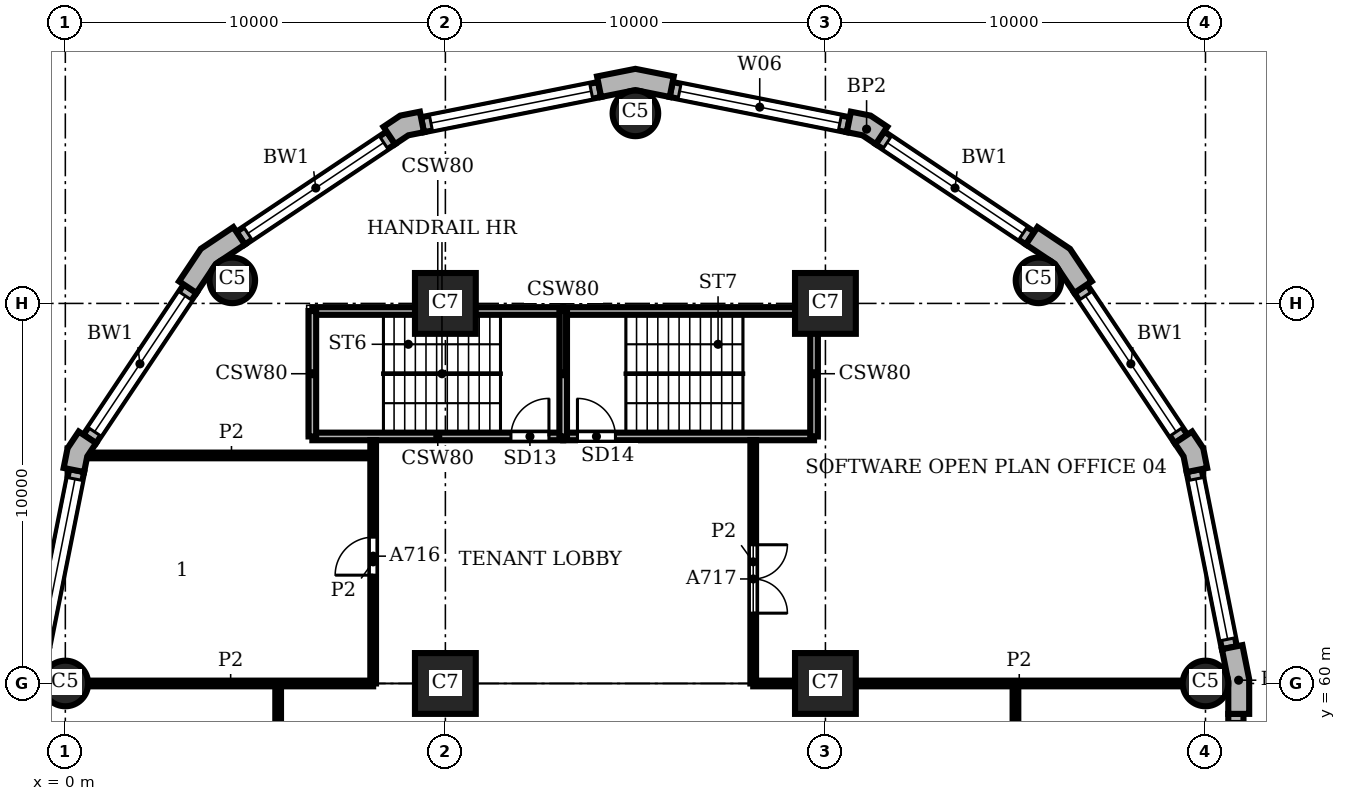
"""IFC4 building model, lengths in metres.
Left out: names, types, materials, properties, quantities, classifications, styles, units other than length and angle.
Written with IfcOpenShell. Run it as: python <this file> out.ifc"""

import sys

from ifc_helpers import new_model, si_unit, direction, frame, frame_2d, origin, origin_2d, place, context, subcontext, project, spatial, polyline, rectangle, circle, outline, extrude, element, fill, save


model = new_model("IFC4")
c1 = context("Model", 3, precision=1e-05, world=origin(), true_north=direction((0.0, 1.0)))
c2 = subcontext(c1, "Body", "Model", "MODEL_VIEW")
j1 = project(units=[si_unit("LENGTHUNIT", "METRE"), si_unit("PLANEANGLEUNIT", "RADIAN")], contexts=[c1])
p1 = place(None, origin())
s1 = spatial("IfcSite", under=j1, at=p1, CompositionType="ELEMENT")
p2 = place(p1, origin())
s2 = spatial("IfcBuilding", under=s1, at=p2, CompositionType="ELEMENT")
p3 = place(p2, frame((0.0, 0.0, 86.1)))
s3 = spatial("IfcBuildingStorey", under=s2, at=p3, CompositionType="ELEMENT", Elevation=86.1)
for number, where, z_axis, x_axis in (
    (1, (30.0, 60.0, 0.0), (0.0, 0.0, 1.0), (1.0, 0.0, 0.0)),
    (2, (25.607, 70.607, 0.0), (0.0, 0.0, 1.0), (1.0, 0.0, 0.0)),
    (3, (15.0, 75.0, 0.0), (0.0, 0.0, 1.0), (1.0, 0.0, 0.0)),
    (4, (4.393, 70.607, 0.0), (0.0, 0.0, 1.0), (1.0, 0.0, 0.0)),
    (5, (0.0, 60.0, 0.0), (0.0, 0.0, 1.0), (1.0, 0.0, 0.0)),
):
    element("IfcColumn", number, at=place(p3, frame(where, z_axis=z_axis, x_axis=x_axis)), inside=s3, PredefinedType="COLUMN", context=c2, shape_type="SweptSolid", body=[
        extrude(circle(Radius=0.6, at=origin_2d()), origin(), (0.0, 0.0, 1.0), 3.9),
    ])
for number, where, z_axis, x_axis in (
    (6, (10.0, 60.0, 0.0), (0.0, 0.0, 1.0), (1.0, 0.0, 0.0)),
    (7, (10.0, 70.0, 0.0), (0.0, 0.0, 1.0), (1.0, 0.0, 0.0)),
    (8, (20.0, 60.0, 0.0), (0.0, 0.0, 1.0), (1.0, 0.0, 0.0)),
    (9, (20.0, 70.0, 0.0), (0.0, 0.0, 1.0), (1.0, 0.0, 0.0)),
):
    element("IfcColumn", number, at=place(p3, frame(where, z_axis=z_axis, x_axis=x_axis)), inside=s3, PredefinedType="COLUMN", context=c2, shape_type="SweptSolid", body=[
        extrude(rectangle(XDim=1.6, YDim=1.6, at=origin_2d()), origin(), (0.0, 0.0, 1.0), 3.9),
    ])
p4 = place(p3, origin())
e10 = element("IfcWall", 10, at=p4, inside=s3, PredefinedType="SOLIDWALL", context=c2, shape_type="SweptSolid", body=[
    extrude(outline(polyline([(31.0, 59.2), (31.15, 59.2), (31.15, 60.113), (30.972, 61.009), (30.825, 60.98), (30.432, 60.902), (30.6, 60.059), (30.6, 59.2), (31.0, 59.2)])), origin(), (0.0, 0.0, 1.0), 3.9),
])
e11 = element("IfcWall", 11, at=p4, inside=s3, PredefinedType="SOLIDWALL", context=c2, shape_type="SweptSolid", body=[
    extrude(outline(polyline([(29.897, 65.641), (30.045, 65.67), (29.941, 66.189), (29.648, 66.629), (29.523, 66.545), (29.19, 66.323), (29.423, 65.974), (29.505, 65.563), (29.897, 65.641)])), origin(), (0.0, 0.0, 1.0), 3.9),
])
e12 = element("IfcWall", 12, at=p4, inside=s3, PredefinedType="SOLIDWALL", context=c2, shape_type="SweptSolid", body=[
    extrude(outline(polyline([(26.883, 70.497), (27.007, 70.58), (26.436, 71.436), (25.58, 72.007), (25.497, 71.883), (25.275, 71.55), (26.039, 71.039), (26.55, 70.275), (26.883, 70.497)])), origin(), (0.0, 0.0, 1.0), 3.9),
])
e13 = element("IfcWall", 13, at=p4, inside=s3, PredefinedType="SOLIDWALL", context=c2, shape_type="SweptSolid", body=[
    extrude(outline(polyline([(21.545, 74.523), (21.629, 74.648), (21.189, 74.941), (20.67, 75.045), (20.641, 74.897), (20.563, 74.505), (20.974, 74.423), (21.323, 74.19), (21.545, 74.523)])), origin(), (0.0, 0.0, 1.0), 3.9),
])
e14 = element("IfcWall", 14, at=p4, inside=s3, PredefinedType="SOLIDWALL", context=c2, shape_type="SweptSolid", body=[
    extrude(outline(polyline([(15.98, 75.825), (16.009, 75.972), (15.0, 76.173), (13.991, 75.972), (14.02, 75.825), (14.098, 75.432), (15.0, 75.612), (15.902, 75.432), (15.98, 75.825)])), origin(), (0.0, 0.0, 1.0), 3.9),
])
e15 = element("IfcWall", 15, at=p4, inside=s3, PredefinedType="SOLIDWALL", context=c2, shape_type="SweptSolid", body=[
    extrude(outline(polyline([(9.359, 74.897), (9.33, 75.045), (8.811, 74.941), (8.371, 74.648), (8.455, 74.523), (8.677, 74.19), (9.026, 74.423), (9.437, 74.505), (9.359, 74.897)])), origin(), (0.0, 0.0, 1.0), 3.9),
])
e16 = element("IfcWall", 16, at=p4, inside=s3, PredefinedType="SOLIDWALL", context=c2, shape_type="SweptSolid", body=[
    extrude(outline(polyline([(4.503, 71.883), (4.42, 72.007), (3.564, 71.436), (2.993, 70.58), (3.117, 70.497), (3.45, 70.275), (3.961, 71.039), (4.725, 71.55), (4.503, 71.883)])), origin(), (0.0, 0.0, 1.0), 3.9),
])
e17 = element("IfcWall", 17, at=p4, inside=s3, PredefinedType="SOLIDWALL", context=c2, shape_type="SweptSolid", body=[
    extrude(outline(polyline([(0.477, 66.545), (0.352, 66.629), (0.059, 66.189), (-0.045, 65.67), (0.103, 65.641), (0.495, 65.563), (0.577, 65.974), (0.81, 66.323), (0.477, 66.545)])), origin(), (0.0, 0.0, 1.0), 3.9),
])
p5 = place(p3, frame((30.8, 40.8, 0.0), z_axis=(0.0, 0.0, 1.0), x_axis=(0.0, 1.0, 0.0)))
e18 = element("IfcWall", 18, at=p5, inside=s3, PredefinedType="SOLIDWALL", context=c2, shape_type="SweptSolid", body=[
    extrude(rectangle(XDim=18.4, YDim=0.4, at=frame_2d((9.2, 0.0))), origin(), (0.0, 0.0, 1.0), 3.9),
])
p6 = place(p5, frame((0.2, 0.0, 0.9)))
e19 = element("IfcOpeningElement", 19, at=p6, cuts=e18, PredefinedType="OPENING", context=c2, shape_type="SweptSolid", body=[
    extrude(rectangle(XDim=8.0, YDim=2.35, at=frame_2d((4.0, 1.175))), frame((0.0, 0.21, 0.0), z_axis=(0.0, -1.0, 0.0), x_axis=(1.0, 0.0, 0.0)), (0.0, 0.0, 1.0), 0.42),
])
p7 = place(p5, frame((10.2, 0.0, 0.9)))
e20 = element("IfcOpeningElement", 20, at=p7, cuts=e18, PredefinedType="OPENING", context=c2, shape_type="SweptSolid", body=[
    extrude(rectangle(XDim=8.0, YDim=2.35, at=frame_2d((4.0, 1.175))), frame((0.0, 0.21, 0.0), z_axis=(0.0, -1.0, 0.0), x_axis=(1.0, 0.0, 0.0)), (0.0, 0.0, 1.0), 0.42),
])
p8 = place(p3, frame((30.629, 60.941, 0.0), z_axis=(0.0, 0.0, 1.0), x_axis=(-0.195098533057, 0.98078364709, 0.0)))
e21 = element("IfcWall", 21, at=p8, inside=s3, PredefinedType="SOLIDWALL", context=c2, shape_type="SweptSolid", body=[
    extrude(rectangle(XDim=4.753, YDim=0.4, at=frame_2d((2.376, 0.0))), origin(), (0.0, 0.0, 1.0), 3.9),
])
p9 = place(p8, frame((0.226, 0.0, 0.9)))
e22 = element("IfcOpeningElement", 22, at=p9, cuts=e21, PredefinedType="OPENING", context=c2, shape_type="SweptSolid", body=[
    extrude(rectangle(XDim=4.3, YDim=2.35, at=frame_2d((2.15, 1.175))), frame((0.0, 0.21, 0.0), z_axis=(0.0, -1.0, 0.0), x_axis=(1.0, 0.0, 0.0)), (0.0, 0.0, 1.0), 0.42),
])
p10 = place(p3, frame((29.357, 66.434, 0.0), z_axis=(0.0, 0.0, 1.0), x_axis=(-0.555541552266, 0.831488775454, 0.0)))
e23 = element("IfcWall", 23, at=p10, inside=s3, PredefinedType="SOLIDWALL", context=c2, shape_type="SweptSolid", body=[
    extrude(rectangle(XDim=4.753, YDim=0.4, at=frame_2d((2.376, 0.0))), origin(), (0.0, 0.0, 1.0), 3.9),
])
p11 = place(p10, frame((0.226, 0.0, 0.9)))
e24 = element("IfcOpeningElement", 24, at=p11, cuts=e23, PredefinedType="OPENING", context=c2, shape_type="SweptSolid", body=[
    extrude(rectangle(XDim=4.3, YDim=2.35, at=frame_2d((2.15, 1.175))), frame((0.0, 0.21, 0.0), z_axis=(0.0, -1.0, 0.0), x_axis=(1.0, 0.0, 0.0)), (0.0, 0.0, 1.0), 0.42),
])
p12 = place(p3, frame((25.386, 71.716, 0.0), z_axis=(0.0, 0.0, 1.0), x_axis=(-0.831488775454, 0.555541552266, 0.0)))
e25 = element("IfcWall", 25, at=p12, inside=s3, PredefinedType="SOLIDWALL", context=c2, shape_type="SweptSolid", body=[
    extrude(rectangle(XDim=4.753, YDim=0.4, at=frame_2d((2.376, 0.0))), origin(), (0.0, 0.0, 1.0), 3.9),
])
p13 = place(p12, frame((0.226, 0.0, 0.9)))
e26 = element("IfcOpeningElement", 26, at=p13, cuts=e25, PredefinedType="OPENING", context=c2, shape_type="SweptSolid", body=[
    extrude(rectangle(XDim=4.3, YDim=2.35, at=frame_2d((2.15, 1.175))), frame((0.0, 0.21, 0.0), z_axis=(0.0, -1.0, 0.0), x_axis=(1.0, 0.0, 0.0)), (0.0, 0.0, 1.0), 0.42),
])
p14 = place(p3, frame((20.602, 74.701, 0.0), z_axis=(0.0, 0.0, 1.0), x_axis=(-0.98078364709, 0.195098533057, 0.0)))
e27 = element("IfcWall", 27, at=p14, inside=s3, PredefinedType="SOLIDWALL", context=c2, shape_type="SweptSolid", body=[
    extrude(rectangle(XDim=4.753, YDim=0.4, at=frame_2d((2.376, 0.0))), origin(), (0.0, 0.0, 1.0), 3.9),
])
p15 = place(p14, frame((0.226, 0.0, 0.9)))
e28 = element("IfcOpeningElement", 28, at=p15, cuts=e27, PredefinedType="OPENING", context=c2, shape_type="SweptSolid", body=[
    extrude(rectangle(XDim=4.3, YDim=2.35, at=frame_2d((2.15, 1.175))), frame((0.0, 0.21, 0.0), z_axis=(0.0, -1.0, 0.0), x_axis=(1.0, 0.0, 0.0)), (0.0, 0.0, 1.0), 0.42),
])
p16 = place(p3, frame((14.059, 75.629, 0.0), z_axis=(0.0, 0.0, 1.0), x_axis=(-0.98078364709, -0.195098533057, 0.0)))
e29 = element("IfcWall", 29, at=p16, inside=s3, PredefinedType="SOLIDWALL", context=c2, shape_type="SweptSolid", body=[
    extrude(rectangle(XDim=4.753, YDim=0.4, at=frame_2d((2.376, 0.0))), origin(), (0.0, 0.0, 1.0), 3.9),
])
p17 = place(p16, frame((0.226, 0.0, 0.9)))
e30 = element("IfcOpeningElement", 30, at=p17, cuts=e29, PredefinedType="OPENING", context=c2, shape_type="SweptSolid", body=[
    extrude(rectangle(XDim=4.3, YDim=2.35, at=frame_2d((2.15, 1.175))), frame((0.0, 0.21, 0.0), z_axis=(0.0, -1.0, 0.0), x_axis=(1.0, 0.0, 0.0)), (0.0, 0.0, 1.0), 0.42),
])
p18 = place(p3, frame((8.566, 74.357, 0.0), z_axis=(0.0, 0.0, 1.0), x_axis=(-0.831488775454, -0.555541552266, 0.0)))
e31 = element("IfcWall", 31, at=p18, inside=s3, PredefinedType="SOLIDWALL", context=c2, shape_type="SweptSolid", body=[
    extrude(rectangle(XDim=4.753, YDim=0.4, at=frame_2d((2.376, 0.0))), origin(), (0.0, 0.0, 1.0), 3.9),
])
p19 = place(p18, frame((0.226, 0.0, 0.9)))
e32 = element("IfcOpeningElement", 32, at=p19, cuts=e31, PredefinedType="OPENING", context=c2, shape_type="SweptSolid", body=[
    extrude(rectangle(XDim=4.3, YDim=2.35, at=frame_2d((2.15, 1.175))), frame((0.0, 0.21, 0.0), z_axis=(0.0, -1.0, 0.0), x_axis=(1.0, 0.0, 0.0)), (0.0, 0.0, 1.0), 0.42),
])
p20 = place(p3, frame((3.284, 70.386, 0.0), z_axis=(0.0, 0.0, 1.0), x_axis=(-0.555541552266, -0.831488775454, 0.0)))
e33 = element("IfcWall", 33, at=p20, inside=s3, PredefinedType="SOLIDWALL", context=c2, shape_type="SweptSolid", body=[
    extrude(rectangle(XDim=4.753, YDim=0.4, at=frame_2d((2.376, 0.0))), origin(), (0.0, 0.0, 1.0), 3.9),
])
p21 = place(p20, frame((0.226, 0.0, 0.9)))
e34 = element("IfcOpeningElement", 34, at=p21, cuts=e33, PredefinedType="OPENING", context=c2, shape_type="SweptSolid", body=[
    extrude(rectangle(XDim=4.3, YDim=2.35, at=frame_2d((2.15, 1.175))), frame((0.0, 0.21, 0.0), z_axis=(0.0, -1.0, 0.0), x_axis=(1.0, 0.0, 0.0)), (0.0, 0.0, 1.0), 0.42),
])
p22 = place(p3, frame((0.299, 65.602, 0.0), z_axis=(0.0, 0.0, 1.0), x_axis=(-0.195098533057, -0.98078364709, 0.0)))
e35 = element("IfcWall", 35, at=p22, inside=s3, PredefinedType="SOLIDWALL", context=c2, shape_type="SweptSolid", body=[
    extrude(rectangle(XDim=4.753, YDim=0.4, at=frame_2d((2.376, 0.0))), origin(), (0.0, 0.0, 1.0), 3.9),
])
p23 = place(p22, frame((0.226, 0.0, 0.9)))
e36 = element("IfcOpeningElement", 36, at=p23, cuts=e35, PredefinedType="OPENING", context=c2, shape_type="SweptSolid", body=[
    extrude(rectangle(XDim=4.3, YDim=2.35, at=frame_2d((2.15, 1.175))), frame((0.0, 0.21, 0.0), z_axis=(0.0, -1.0, 0.0), x_axis=(1.0, 0.0, 0.0)), (0.0, 0.0, 1.0), 0.42),
])
p24 = place(p3, frame((6.5, 66.5, 0.0), z_axis=(0.0, 0.0, 1.0), x_axis=(1.0, 0.0, 0.0)))
e37 = element("IfcWall", 37, at=p24, inside=s3, PredefinedType="SHEAR", context=c2, shape_type="SweptSolid", body=[
    extrude(rectangle(XDim=6.6, YDim=0.2, at=frame_2d((3.3, 0.0))), origin(), (0.0, 0.0, 1.0), 3.58),
])
p25 = place(p24, frame((5.225, 0.0, 0.0)))
e38 = element("IfcOpeningElement", 38, at=p25, cuts=e37, PredefinedType="OPENING", context=c2, shape_type="SweptSolid", body=[
    extrude(rectangle(XDim=1.0, YDim=2.1, at=frame_2d((0.5, 1.05))), frame((0.0, 0.11, 0.0), z_axis=(0.0, -1.0, 0.0), x_axis=(1.0, 0.0, 0.0)), (0.0, 0.0, 1.0), 0.22),
])
p26 = place(p3, frame((13.1, 66.5, 0.0), z_axis=(0.0, 0.0, 1.0), x_axis=(1.0, 0.0, 0.0)))
e39 = element("IfcWall", 39, at=p26, inside=s3, PredefinedType="SHEAR", context=c2, shape_type="SweptSolid", body=[
    extrude(rectangle(XDim=6.6, YDim=0.2, at=frame_2d((3.3, 0.0))), origin(), (0.0, 0.0, 1.0), 3.58),
])
p27 = place(p26, frame((0.375, 0.0, 0.0)))
e40 = element("IfcOpeningElement", 40, at=p27, cuts=e39, PredefinedType="OPENING", context=c2, shape_type="SweptSolid", body=[
    extrude(rectangle(XDim=1.0, YDim=2.1, at=frame_2d((0.5, 1.05))), frame((0.0, 0.11, 0.0), z_axis=(0.0, -1.0, 0.0), x_axis=(1.0, 0.0, 0.0)), (0.0, 0.0, 1.0), 0.22),
])
p28 = place(p3, frame((6.5, 69.8, 0.0), z_axis=(0.0, 0.0, 1.0), x_axis=(1.0, 0.0, 0.0)))
e41 = element("IfcWall", 41, at=p28, inside=s3, PredefinedType="SHEAR", context=c2, shape_type="SweptSolid", body=[
    extrude(rectangle(XDim=6.6, YDim=0.2, at=frame_2d((3.3, 0.0))), origin(), (0.0, 0.0, 1.0), 3.58),
])
p29 = place(p3, frame((13.1, 69.8, 0.0), z_axis=(0.0, 0.0, 1.0), x_axis=(1.0, 0.0, 0.0)))
e42 = element("IfcWall", 42, at=p29, inside=s3, PredefinedType="SHEAR", context=c2, shape_type="SweptSolid", body=[
    extrude(rectangle(XDim=6.6, YDim=0.2, at=frame_2d((3.3, 0.0))), origin(), (0.0, 0.0, 1.0), 3.58),
])
for number, where, z_axis, x_axis in (
    (43, (6.5, 66.5, 0.0), (0.0, 0.0, 1.0), (0.0, 1.0, 0.0)),
    (44, (13.1, 66.5, 0.0), (0.0, 0.0, 1.0), (0.0, 1.0, 0.0)),
    (45, (19.7, 66.5, 0.0), (0.0, 0.0, 1.0), (0.0, 1.0, 0.0)),
):
    element("IfcWall", number, at=place(p3, frame(where, z_axis=z_axis, x_axis=x_axis)), inside=s3, PredefinedType="SHEAR", context=c2, shape_type="SweptSolid", body=[
        extrude(rectangle(XDim=3.3, YDim=0.2, at=frame_2d((1.65, 0.0))), origin(), (0.0, 0.0, 1.0), 3.58),
    ])
p30 = place(p3, frame((5.6, 5.6, 0.0), z_axis=(0.0, 0.0, 1.0), x_axis=(0.0, 1.0, 0.0)))
e46 = element("IfcWall", 46, at=p30, inside=s3, PredefinedType="PARTITIONING", context=c2, shape_type="SweptSolid", body=[
    extrude(rectangle(XDim=54.4, YDim=0.15, at=frame_2d((27.2, 0.0))), origin(), (0.0, 0.0, 1.0), 3.58),
])
p31 = place(p30, frame((40.8, 0.0, 0.0)))
e47 = element("IfcOpeningElement", 47, at=p31, cuts=e46, PredefinedType="OPENING", context=c2, shape_type="SweptSolid", body=[
    extrude(rectangle(XDim=1.8, YDim=2.1, at=frame_2d((0.9, 1.05))), frame((0.0, 0.085, 0.0), z_axis=(0.0, -1.0, 0.0), x_axis=(1.0, 0.0, 0.0)), (0.0, 0.0, 1.0), 0.17),
])
p32 = place(p3, frame((8.1, 60.0, 0.0), z_axis=(0.0, 0.0, 1.0), x_axis=(0.0, 1.0, 0.0)))
e48 = element("IfcWall", 48, at=p32, inside=s3, PredefinedType="PARTITIONING", context=c2, shape_type="SweptSolid", body=[
    extrude(rectangle(XDim=6.4, YDim=0.15, at=frame_2d((3.2, 0.0))), origin(), (0.0, 0.0, 1.0), 3.58),
])
p33 = place(p32, frame((2.85, 0.0, 0.0)))
e49 = element("IfcOpeningElement", 49, at=p33, cuts=e48, PredefinedType="OPENING", context=c2, shape_type="SweptSolid", body=[
    extrude(rectangle(XDim=1.0, YDim=2.1, at=frame_2d((0.5, 1.05))), frame((0.0, 0.085, 0.0), z_axis=(0.0, -1.0, 0.0), x_axis=(1.0, 0.0, 0.0)), (0.0, 0.0, 1.0), 0.17),
])
p34 = place(p3, frame((18.1, 60.0, 0.0), z_axis=(0.0, 0.0, 1.0), x_axis=(0.0, 1.0, 0.0)))
e50 = element("IfcWall", 50, at=p34, inside=s3, PredefinedType="PARTITIONING", context=c2, shape_type="SweptSolid", body=[
    extrude(rectangle(XDim=6.4, YDim=0.15, at=frame_2d((3.2, 0.0))), origin(), (0.0, 0.0, 1.0), 3.58),
])
p35 = place(p34, frame((1.85, 0.0, 0.0)))
e51 = element("IfcOpeningElement", 51, at=p35, cuts=e50, PredefinedType="OPENING", context=c2, shape_type="SweptSolid", body=[
    extrude(rectangle(XDim=1.8, YDim=2.1, at=frame_2d((0.9, 1.05))), frame((0.0, 0.085, 0.0), z_axis=(0.0, -1.0, 0.0), x_axis=(1.0, 0.0, 0.0)), (0.0, 0.0, 1.0), 0.17),
])
p36 = place(p3, frame((25.0, 57.3, 0.0), z_axis=(0.0, 0.0, 1.0), x_axis=(0.0, 1.0, 0.0)))
e52 = element("IfcWall", 52, at=p36, inside=s3, PredefinedType="PARTITIONING", context=c2, shape_type="SweptSolid", body=[
    extrude(rectangle(XDim=2.7, YDim=0.15, at=frame_2d((1.35, 0.0))), origin(), (0.0, 0.0, 1.0), 3.58),
])
p37 = place(p3, frame((0.6, 60.0, 0.0), z_axis=(0.0, 0.0, 1.0), x_axis=(1.0, 0.0, 0.0)))
e53 = element("IfcWall", 53, at=p37, inside=s3, PredefinedType="PARTITIONING", context=c2, shape_type="SweptSolid", body=[
    extrude(rectangle(XDim=7.5, YDim=0.15, at=frame_2d((3.75, 0.0))), origin(), (0.0, 0.0, 1.0), 3.58),
])
p38 = place(p3, frame((18.1, 60.0, 0.0), z_axis=(0.0, 0.0, 1.0), x_axis=(1.0, 0.0, 0.0)))
e54 = element("IfcWall", 54, at=p38, inside=s3, PredefinedType="PARTITIONING", context=c2, shape_type="SweptSolid", body=[
    extrude(rectangle(XDim=1.1, YDim=0.15, at=frame_2d((0.55, 0.0))), origin(), (0.0, 0.0, 1.0), 3.58),
])
p39 = place(p3, frame((20.8, 60.0, 0.0), z_axis=(0.0, 0.0, 1.0), x_axis=(1.0, 0.0, 0.0)))
e55 = element("IfcWall", 55, at=p39, inside=s3, PredefinedType="PARTITIONING", context=c2, shape_type="SweptSolid", body=[
    extrude(rectangle(XDim=8.6, YDim=0.15, at=frame_2d((4.3, 0.0))), origin(), (0.0, 0.0, 1.0), 3.58),
])
p40 = place(p3, frame((0.644, 66.0, 0.0), z_axis=(0.0, 0.0, 1.0), x_axis=(1.0, 0.0, 0.0)))
e56 = element("IfcWall", 56, at=p40, inside=s3, PredefinedType="PARTITIONING", context=c2, shape_type="SweptSolid", body=[
    extrude(rectangle(XDim=7.456, YDim=0.15, at=frame_2d((3.728, 0.0))), origin(), (0.0, 0.0, 1.0), 3.58),
])
p41 = place(p9, origin())
e57 = element("IfcWindow", 57, at=p41, inside=s3, PartitioningType="SINGLE_PANEL", PredefinedType="WINDOW", context=c2, shape_type="SweptSolid", body=[
    extrude(rectangle(XDim=4.3, YDim=2.35, at=frame_2d((2.15, 1.175))), frame((0.0, 0.16, 0.0), z_axis=(0.0, -1.0, 0.0), x_axis=(1.0, 0.0, 0.0)), (0.0, 0.0, 1.0), 0.06),
])
fill(e22, e57)
p42 = place(p11, origin())
e58 = element("IfcWindow", 58, at=p42, inside=s3, PartitioningType="SINGLE_PANEL", PredefinedType="WINDOW", context=c2, shape_type="SweptSolid", body=[
    extrude(rectangle(XDim=4.3, YDim=2.35, at=frame_2d((2.15, 1.175))), frame((0.0, 0.16, 0.0), z_axis=(0.0, -1.0, 0.0), x_axis=(1.0, 0.0, 0.0)), (0.0, 0.0, 1.0), 0.06),
])
fill(e24, e58)
p43 = place(p13, origin())
e59 = element("IfcWindow", 59, at=p43, inside=s3, PartitioningType="SINGLE_PANEL", PredefinedType="WINDOW", context=c2, shape_type="SweptSolid", body=[
    extrude(rectangle(XDim=4.3, YDim=2.35, at=frame_2d((2.15, 1.175))), frame((0.0, 0.16, 0.0), z_axis=(0.0, -1.0, 0.0), x_axis=(1.0, 0.0, 0.0)), (0.0, 0.0, 1.0), 0.06),
])
fill(e26, e59)
p44 = place(p15, origin())
e60 = element("IfcWindow", 60, at=p44, inside=s3, PartitioningType="SINGLE_PANEL", PredefinedType="WINDOW", context=c2, shape_type="SweptSolid", body=[
    extrude(rectangle(XDim=4.3, YDim=2.35, at=frame_2d((2.15, 1.175))), frame((0.0, 0.16, 0.0), z_axis=(0.0, -1.0, 0.0), x_axis=(1.0, 0.0, 0.0)), (0.0, 0.0, 1.0), 0.06),
])
fill(e28, e60)
p45 = place(p17, origin())
e61 = element("IfcWindow", 61, at=p45, inside=s3, PartitioningType="SINGLE_PANEL", PredefinedType="WINDOW", context=c2, shape_type="SweptSolid", body=[
    extrude(rectangle(XDim=4.3, YDim=2.35, at=frame_2d((2.15, 1.175))), frame((0.0, 0.16, 0.0), z_axis=(0.0, -1.0, 0.0), x_axis=(1.0, 0.0, 0.0)), (0.0, 0.0, 1.0), 0.06),
])
fill(e30, e61)
p46 = place(p19, origin())
e62 = element("IfcWindow", 62, at=p46, inside=s3, PartitioningType="SINGLE_PANEL", PredefinedType="WINDOW", context=c2, shape_type="SweptSolid", body=[
    extrude(rectangle(XDim=4.3, YDim=2.35, at=frame_2d((2.15, 1.175))), frame((0.0, 0.16, 0.0), z_axis=(0.0, -1.0, 0.0), x_axis=(1.0, 0.0, 0.0)), (0.0, 0.0, 1.0), 0.06),
])
fill(e32, e62)
p47 = place(p21, origin())
e63 = element("IfcWindow", 63, at=p47, inside=s3, PartitioningType="SINGLE_PANEL", PredefinedType="WINDOW", context=c2, shape_type="SweptSolid", body=[
    extrude(rectangle(XDim=4.3, YDim=2.35, at=frame_2d((2.15, 1.175))), frame((0.0, 0.16, 0.0), z_axis=(0.0, -1.0, 0.0), x_axis=(1.0, 0.0, 0.0)), (0.0, 0.0, 1.0), 0.06),
])
fill(e34, e63)
p48 = place(p23, origin())
e64 = element("IfcWindow", 64, at=p48, inside=s3, PartitioningType="SINGLE_PANEL", PredefinedType="WINDOW", context=c2, shape_type="SweptSolid", body=[
    extrude(rectangle(XDim=4.3, YDim=2.35, at=frame_2d((2.15, 1.175))), frame((0.0, 0.16, 0.0), z_axis=(0.0, -1.0, 0.0), x_axis=(1.0, 0.0, 0.0)), (0.0, 0.0, 1.0), 0.06),
])
fill(e36, e64)
p49 = place(p25, origin())
e65 = element("IfcDoor", 65, at=p49, inside=s3, OperationType="SINGLE_SWING_RIGHT", PredefinedType="DOOR", context=c2, shape_type="SweptSolid", body=[
    extrude(rectangle(XDim=1.0, YDim=2.1, at=frame_2d((0.5, 1.05))), frame((0.0, 0.025, 0.0), z_axis=(0.0, -1.0, 0.0), x_axis=(1.0, 0.0, 0.0)), (0.0, 0.0, 1.0), 0.05),
])
fill(e38, e65)
p50 = place(p27, origin())
e66 = element("IfcDoor", 66, at=p50, inside=s3, OperationType="SINGLE_SWING_LEFT", PredefinedType="DOOR", context=c2, shape_type="SweptSolid", body=[
    extrude(rectangle(XDim=1.0, YDim=2.1, at=frame_2d((0.5, 1.05))), frame((0.0, 0.025, 0.0), z_axis=(0.0, -1.0, 0.0), x_axis=(1.0, 0.0, 0.0)), (0.0, 0.0, 1.0), 0.05),
])
fill(e40, e66)
p51 = place(p33, origin())
e67 = element("IfcDoor", 67, at=p51, inside=s3, OperationType="SINGLE_SWING_LEFT", PredefinedType="DOOR", context=c2, shape_type="SweptSolid", body=[
    extrude(rectangle(XDim=1.0, YDim=2.1, at=frame_2d((0.5, 1.05))), frame((0.0, 0.025, 0.0), z_axis=(0.0, -1.0, 0.0), x_axis=(1.0, 0.0, 0.0)), (0.0, 0.0, 1.0), 0.05),
])
fill(e49, e67)
p52 = place(p35, frame((1.8, 0.0, 0.0), z_axis=(0.0, 0.0, 1.0), x_axis=(-1.0, 0.0, 0.0)))
e68 = element("IfcDoor", 68, at=p52, inside=s3, OperationType="DOUBLE_DOOR_SINGLE_SWING", PredefinedType="DOOR", context=c2, shape_type="SweptSolid", body=[
    extrude(rectangle(XDim=1.8, YDim=2.1, at=frame_2d((0.9, 1.05))), frame((0.0, 0.025, 0.0), z_axis=(0.0, -1.0, 0.0), x_axis=(1.0, 0.0, 0.0)), (0.0, 0.0, 1.0), 0.05),
])
fill(e51, e68)
save(model, sys.argv[1])
